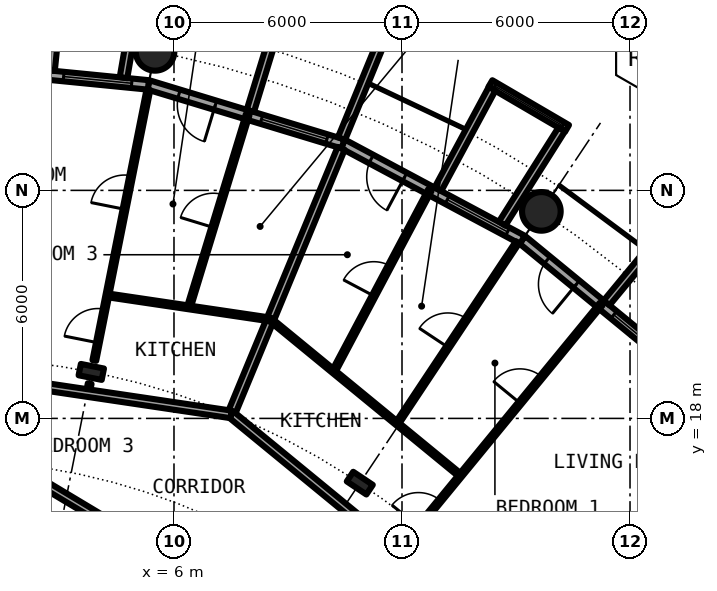
"""IFC4 building model, lengths in metres.
Left out: names, types, materials, properties, quantities, classifications, styles, units other than length and angle.
Written with IfcOpenShell. Run it as: python <this file> out.ifc"""

import sys

from ifc_helpers import new_model, si_unit, direction, frame, frame_2d, origin, origin_2d, place, context, subcontext, project, spatial, rectangle, circle, hollow_circle, i_section, extrude, element, fill, save


model = new_model("IFC4")
c1 = context("Model", 3, precision=1e-05, world=origin(), true_north=direction((0.0, 1.0)))
c2 = subcontext(c1, "Body", "Model", "MODEL_VIEW")
j1 = project(units=[si_unit("LENGTHUNIT", "METRE"), si_unit("PLANEANGLEUNIT", "RADIAN")], contexts=[c1])
p1 = place(None, origin())
s1 = spatial("IfcSite", under=j1, at=p1, CompositionType="ELEMENT")
p2 = place(p1, origin())
s2 = spatial("IfcBuilding", under=s1, at=p2, CompositionType="ELEMENT")
p3 = place(p2, frame((0.0, 0.0, 47.2)))
s3 = spatial("IfcBuildingStorey", under=s2, at=p3, CompositionType="ELEMENT", Elevation=47.2)
for number, where, z_axis, x_axis in (
    (1, (15.667, 23.448, 0.0), (0.0, 0.0, 1.0), (1.0, 0.0, 0.0)),
    (2, (5.501, 27.658, 0.0), (0.0, 0.0, 1.0), (1.0, 0.0, 0.0)),
):
    element("IfcColumn", number, at=place(p3, frame(where, z_axis=z_axis, x_axis=x_axis)), inside=s3, PredefinedType="COLUMN", context=c2, shape_type="SweptSolid", body=[
        extrude(hollow_circle(Radius=0.508, WallThickness=0.05, at=origin_2d()), origin(), (0.0, 0.0, 1.0), 3.05),
    ])
for number, where, z_axis, x_axis in (
    (3, (10.889, 16.297, 0.0), (0.0, 0.0, 1.0), (0.556, 0.831, 0.0)),
    (4, (3.824, 19.223, 0.0), (0.0, 0.0, 1.0), (0.195, 0.981, 0.0)),
):
    element("IfcColumn", number, at=place(p3, frame(where, z_axis=z_axis, x_axis=x_axis)), inside=s3, PredefinedType="COLUMN", context=c2, shape_type="SweptSolid", body=[
        extrude(i_section(OverallWidth=0.305, OverallDepth=0.62, WebThickness=0.021, FlangeThickness=0.04, FilletRadius=0.027, at=origin_2d()), origin(), (0.0, 0.0, 1.0), 3.05),
    ])
p4 = place(p3, frame((19.304, 19.304, 0.0), z_axis=(0.0, 0.0, 1.0), x_axis=(-0.773019449054, 0.634382322723, 0.0)))
e5 = element("IfcWall", 5, at=p4, inside=s3, PredefinedType="SOLIDWALL", context=c2, shape_type="SweptSolid", body=[
    extrude(rectangle(XDim=5.352, YDim=0.25, at=frame_2d((2.676, 0.0))), origin(), (0.0, 0.0, 1.0), 2.7),
])
p5 = place(p4, frame((0.441, 0.0, 0.3)))
e6 = element("IfcOpeningElement", 6, at=p5, cuts=e5, PredefinedType="OPENING", context=c2, shape_type="SweptSolid", body=[
    extrude(rectangle(XDim=1.8, YDim=2.1, at=frame_2d((0.9, 1.05))), frame((0.0, 0.135, 0.0), z_axis=(0.0, -1.0, 0.0), x_axis=(1.0, 0.0, 0.0)), (0.0, 0.0, 1.0), 0.27),
])
p6 = place(p4, frame((3.51, 0.0, 0.0)))
e7 = element("IfcOpeningElement", 7, at=p6, cuts=e5, PredefinedType="OPENING", context=c2, shape_type="SweptSolid", body=[
    extrude(rectangle(XDim=1.0, YDim=2.2, at=frame_2d((0.5, 1.1))), frame((0.0, 0.135, 0.0), z_axis=(0.0, -1.0, 0.0), x_axis=(1.0, 0.0, 0.0)), (0.0, 0.0, 1.0), 0.27),
])
p7 = place(p3, frame((17.384, 21.041, -0.03), z_axis=(0.0, 0.0, 1.0), x_axis=(0.63709551667, 0.770784861449, 0.0)))
e8 = element("IfcWall", 8, at=p7, inside=s3, PredefinedType="SOLIDWALL", context=c2, shape_type="SweptSolid", body=[
    extrude(rectangle(XDim=3.006, YDim=0.2, at=frame_2d((1.503, 0.0))), origin(), (0.0, 0.0, 1.0), 2.73),
])
p8 = place(p3, frame((15.167, 22.699, 0.0), z_axis=(0.0, 0.0, 1.0), x_axis=(-0.881915646801, 0.471407246368, 0.0)))
e9 = element("IfcWall", 9, at=p8, inside=s3, PredefinedType="SOLIDWALL", context=c2, shape_type="SweptSolid", body=[
    extrude(rectangle(XDim=5.352, YDim=0.25, at=frame_2d((2.676, 0.0))), origin(), (0.0, 0.0, 1.0), 2.7),
])
p9 = place(p8, frame((0.441, 0.0, 0.3)))
e10 = element("IfcOpeningElement", 10, at=p9, cuts=e9, PredefinedType="OPENING", context=c2, shape_type="SweptSolid", body=[
    extrude(rectangle(XDim=1.8, YDim=2.1, at=frame_2d((0.9, 1.05))), frame((0.0, 0.135, 0.0), z_axis=(0.0, -1.0, 0.0), x_axis=(1.0, 0.0, 0.0)), (0.0, 0.0, 1.0), 0.27),
])
p10 = place(p8, frame((3.51, 0.0, 0.0)))
e11 = element("IfcOpeningElement", 11, at=p10, cuts=e9, PredefinedType="OPENING", context=c2, shape_type="SweptSolid", body=[
    extrude(rectangle(XDim=1.0, YDim=2.2, at=frame_2d((0.5, 1.1))), frame((0.0, 0.135, 0.0), z_axis=(0.0, -1.0, 0.0), x_axis=(1.0, 0.0, 0.0)), (0.0, 0.0, 1.0), 0.27),
])
p11 = place(p3, frame((16.344, 25.633, -0.03), z_axis=(0.0, 0.0, 1.0), x_axis=(-0.863346521872, 0.504611517081, 0.0)))
e12 = element("IfcWall", 12, at=p11, inside=s3, PredefinedType="SOLIDWALL", context=c2, shape_type="SweptSolid", body=[
    extrude(rectangle(XDim=2.336, YDim=0.2, at=frame_2d((1.168, 0.0))), origin(), (0.0, 0.0, 1.0), 2.73),
])
p12 = place(p11, frame((0.128, 0.0, 0.33)))
e13 = element("IfcOpeningElement", 13, at=p12, cuts=e12, PredefinedType="OPENING", context=c2, shape_type="SweptSolid", body=[
    extrude(circle(Radius=1.04, at=frame_2d((1.04, 1.04))), frame((0.0, 0.11, 0.0), z_axis=(0.0, -1.0, 0.0), x_axis=(1.0, 0.0, 0.0)), (0.0, 0.0, 1.0), 0.22),
])
p13 = place(p3, frame((14.635, 23.126, -0.03), z_axis=(0.0, 0.0, 1.0), x_axis=(0.534437802731, 0.845207805816, 0.0)))
e14 = element("IfcWall", 14, at=p13, inside=s3, PredefinedType="SOLIDWALL", context=c2, shape_type="SweptSolid", body=[
    extrude(rectangle(XDim=2.932, YDim=0.2, at=frame_2d((1.466, 0.0))), origin(), (0.0, 0.0, 1.0), 2.73),
])
p14 = place(p3, frame((12.945, 24.029, -0.03), z_axis=(0.0, 0.0, 1.0), x_axis=(0.474424310775, 0.88029629861, 0.0)))
e15 = element("IfcWall", 15, at=p14, inside=s3, PredefinedType="SOLIDWALL", context=c2, shape_type="SweptSolid", body=[
    extrude(rectangle(XDim=3.006, YDim=0.2, at=frame_2d((1.503, 0.0))), origin(), (0.0, 0.0, 1.0), 2.73),
])
p15 = place(p3, frame((10.447, 25.222, 0.0), z_axis=(0.0, 0.0, 1.0), x_axis=(-0.956965678721, 0.290201119486, 0.0)))
e16 = element("IfcWall", 16, at=p15, inside=s3, PredefinedType="SOLIDWALL", context=c2, shape_type="SweptSolid", body=[
    extrude(rectangle(XDim=5.351, YDim=0.25, at=frame_2d((2.676, 0.0))), origin(), (0.0, 0.0, 1.0), 2.7),
])
p16 = place(p15, frame((0.441, 0.0, 0.3)))
e17 = element("IfcOpeningElement", 17, at=p16, cuts=e16, PredefinedType="OPENING", context=c2, shape_type="SweptSolid", body=[
    extrude(rectangle(XDim=1.8, YDim=2.1, at=frame_2d((0.9, 1.05))), frame((0.0, 0.135, 0.0), z_axis=(0.0, -1.0, 0.0), x_axis=(1.0, 0.0, 0.0)), (0.0, 0.0, 1.0), 0.27),
])
p17 = place(p15, frame((3.51, 0.0, 0.0)))
e18 = element("IfcOpeningElement", 18, at=p17, cuts=e16, PredefinedType="OPENING", context=c2, shape_type="SweptSolid", body=[
    extrude(rectangle(XDim=1.0, YDim=2.2, at=frame_2d((0.5, 1.1))), frame((0.0, 0.135, 0.0), z_axis=(0.0, -1.0, 0.0), x_axis=(1.0, 0.0, 0.0)), (0.0, 0.0, 1.0), 0.27),
])
p18 = place(p3, frame((10.409, 25.364, -0.03), z_axis=(0.0, 0.0, 1.0), x_axis=(0.379509886562, 0.925187681501, 0.0)))
e19 = element("IfcWall", 19, at=p18, inside=s3, PredefinedType="SOLIDWALL", context=c2, shape_type="SweptSolid", body=[
    extrude(rectangle(XDim=2.883, YDim=0.2, at=frame_2d((1.441, 0.0))), origin(), (0.0, 0.0, 1.0), 2.73),
])
p19 = place(p3, frame((8.009, 26.092, -0.03), z_axis=(0.0, 0.0, 1.0), x_axis=(0.293406695073, 0.955987715029, 0.0)))
e20 = element("IfcWall", 20, at=p19, inside=s3, PredefinedType="SOLIDWALL", context=c2, shape_type="SweptSolid", body=[
    extrude(rectangle(XDim=3.006, YDim=0.2, at=frame_2d((1.503, 0.0))), origin(), (0.0, 0.0, 1.0), 2.73),
])
p20 = place(p3, frame((5.326, 26.775, 0.0), z_axis=(0.0, 0.0, 1.0), x_axis=(-0.995173996315, 0.098126026407, 0.0)))
e21 = element("IfcWall", 21, at=p20, inside=s3, PredefinedType="SOLIDWALL", context=c2, shape_type="SweptSolid", body=[
    extrude(rectangle(XDim=5.352, YDim=0.25, at=frame_2d((2.676, 0.0))), origin(), (0.0, 0.0, 1.0), 2.7),
])
p21 = place(p20, frame((0.441, 0.0, 0.3)))
e22 = element("IfcOpeningElement", 22, at=p21, cuts=e21, PredefinedType="OPENING", context=c2, shape_type="SweptSolid", body=[
    extrude(rectangle(XDim=1.8, YDim=2.1, at=frame_2d((0.9, 1.05))), frame((0.0, 0.135, 0.0), z_axis=(0.0, -1.0, 0.0), x_axis=(1.0, 0.0, 0.0)), (0.0, 0.0, 1.0), 0.27),
])
p22 = place(p20, frame((3.51, 0.0, 0.0)))
e23 = element("IfcOpeningElement", 23, at=p22, cuts=e21, PredefinedType="OPENING", context=c2, shape_type="SweptSolid", body=[
    extrude(rectangle(XDim=1.0, YDim=2.2, at=frame_2d((0.5, 1.1))), frame((0.0, 0.135, 0.0), z_axis=(0.0, -1.0, 0.0), x_axis=(1.0, 0.0, 0.0)), (0.0, 0.0, 1.0), 0.27),
])
p23 = place(p3, frame((4.671, 26.966, -0.03), z_axis=(0.0, 0.0, 1.0), x_axis=(0.170539878907, 0.985350774954, 0.0)))
e24 = element("IfcWall", 24, at=p23, inside=s3, PredefinedType="SOLIDWALL", context=c2, shape_type="SweptSolid", body=[
    extrude(rectangle(XDim=2.932, YDim=0.2, at=frame_2d((1.466, 0.0))), origin(), (0.0, 0.0, 1.0), 2.73),
])
p24 = place(p3, frame((2.764, 27.153, -0.03), z_axis=(0.0, 0.0, 1.0), x_axis=(0.101505487237, 0.994834979311, 0.0)))
e25 = element("IfcWall", 25, at=p24, inside=s3, PredefinedType="SOLIDWALL", context=c2, shape_type="SweptSolid", body=[
    extrude(rectangle(XDim=3.007, YDim=0.2, at=frame_2d((1.503, 0.0))), origin(), (0.0, 0.0, 1.0), 2.73),
])
p25 = place(p3, frame((3.733, 18.667, 0.0), z_axis=(0.0, 0.0, 1.0), x_axis=(0.193340656307, 0.981131688724, 0.0)))
e26 = element("IfcWall", 26, at=p25, inside=s3, PredefinedType="PARTITIONING", context=c2, shape_type="SweptSolid", body=[
    extrude(rectangle(XDim=0.254, YDim=0.1, at=frame_2d((0.127, 0.0))), origin(), (0.0, 0.0, 1.0), 2.7),
])
p26 = place(p3, frame((3.904, 19.524, 0.0), z_axis=(0.0, 0.0, 1.0), x_axis=(0.195857618189, 0.980632343642, 0.0)))
e27 = element("IfcWall", 27, at=p26, inside=s3, PredefinedType="PARTITIONING", context=c2, shape_type="SweptSolid", body=[
    extrude(rectangle(XDim=7.265, YDim=0.1, at=frame_2d((3.632, 0.0))), origin(), (0.0, 0.0, 1.0), 2.7),
])
p27 = place(p26, frame((0.476, 0.0, 0.0)))
e28 = element("IfcOpeningElement", 28, at=p27, cuts=e27, PredefinedType="OPENING", context=c2, shape_type="SweptSolid", body=[
    extrude(rectangle(XDim=0.9, YDim=2.3, at=frame_2d((0.45, 1.15))), frame((0.0, 0.06, 0.0), z_axis=(0.0, -1.0, 0.0), x_axis=(1.0, 0.0, 0.0)), (0.0, 0.0, 1.0), 0.12),
])
p28 = place(p26, frame((4.058, 0.0, 0.0)))
e29 = element("IfcOpeningElement", 29, at=p28, cuts=e27, PredefinedType="OPENING", context=c2, shape_type="SweptSolid", body=[
    extrude(rectangle(XDim=0.9, YDim=2.3, at=frame_2d((0.45, 1.15))), frame((0.0, 0.06, 0.0), z_axis=(0.0, -1.0, 0.0), x_axis=(1.0, 0.0, 0.0)), (0.0, 0.0, 1.0), 0.12),
])
p29 = place(p3, frame((6.39, 20.921, 0.0), z_axis=(0.0, 0.0, 1.0), x_axis=(0.292081613207, 0.956393397732, 0.0)))
e30 = element("IfcWall", 30, at=p29, inside=s3, PredefinedType="PARTITIONING", context=c2, shape_type="SweptSolid", body=[
    extrude(rectangle(XDim=5.3, YDim=0.1, at=frame_2d((2.65, 0.0))), origin(), (0.0, 0.0, 1.0), 2.7),
])
p30 = place(p29, frame((2.2, 0.0, 0.0)))
e31 = element("IfcOpeningElement", 31, at=p30, cuts=e30, PredefinedType="OPENING", context=c2, shape_type="SweptSolid", body=[
    extrude(rectangle(XDim=0.9, YDim=2.3, at=frame_2d((0.45, 1.15))), frame((0.0, 0.06, 0.0), z_axis=(0.0, -1.0, 0.0), x_axis=(1.0, 0.0, 0.0)), (0.0, 0.0, 1.0), 0.12),
])
p31 = place(p3, frame((7.501, 18.108, 0.0), z_axis=(0.0, 0.0, 1.0), x_axis=(0.382600411313, 0.923913916587, 0.0)))
e32 = element("IfcWall", 32, at=p31, inside=s3, PredefinedType="PARTITIONING", context=c2, shape_type="SweptSolid", body=[
    extrude(rectangle(XDim=7.574, YDim=0.2, at=frame_2d((3.787, 0.0))), origin(), (0.0, 0.0, 1.0), 2.7),
])
p32 = place(p3, frame((10.202, 19.234, 0.0), z_axis=(0.0, 0.0, 1.0), x_axis=(0.468610030042, 0.883405139075, 0.0)))
e33 = element("IfcWall", 33, at=p32, inside=s3, PredefinedType="PARTITIONING", context=c2, shape_type="SweptSolid", body=[
    extrude(rectangle(XDim=5.403, YDim=0.1, at=frame_2d((2.702, 0.0))), origin(), (0.0, 0.0, 1.0), 2.7),
])
p33 = place(p32, frame((2.252, 0.0, 0.0)))
e34 = element("IfcOpeningElement", 34, at=p33, cuts=e33, PredefinedType="OPENING", context=c2, shape_type="SweptSolid", body=[
    extrude(rectangle(XDim=0.9, YDim=2.3, at=frame_2d((0.45, 1.15))), frame((0.0, 0.06, 0.0), z_axis=(0.0, -1.0, 0.0), x_axis=(1.0, 0.0, 0.0)), (0.0, 0.0, 1.0), 0.12),
])
p34 = place(p3, frame((11.87, 17.865, 0.0), z_axis=(0.0, 0.0, 1.0), x_axis=(0.553440102418, 0.832888980018, 0.0)))
e35 = element("IfcWall", 35, at=p34, inside=s3, PredefinedType="PARTITIONING", context=c2, shape_type="SweptSolid", body=[
    extrude(rectangle(XDim=5.726, YDim=0.1, at=frame_2d((2.863, 0.0))), origin(), (0.0, 0.0, 1.0), 2.7),
])
p35 = place(p34, frame((2.413, 0.0, 0.0)))
e36 = element("IfcOpeningElement", 36, at=p35, cuts=e35, PredefinedType="OPENING", context=c2, shape_type="SweptSolid", body=[
    extrude(rectangle(XDim=0.9, YDim=2.3, at=frame_2d((0.45, 1.15))), frame((0.0, 0.06, 0.0), z_axis=(0.0, -1.0, 0.0), x_axis=(1.0, 0.0, 0.0)), (0.0, 0.0, 1.0), 0.12),
])
p36 = place(p3, frame((11.899, 14.499, 0.0), z_axis=(0.0, 0.0, 1.0), x_axis=(0.634396151441, 0.77300810024, 0.0)))
e37 = element("IfcWall", 37, at=p36, inside=s3, PredefinedType="PARTITIONING", context=c2, shape_type="SweptSolid", body=[
    extrude(rectangle(XDim=8.419, YDim=0.1, at=frame_2d((4.209, 0.0))), origin(), (0.0, 0.0, 1.0), 2.7),
])
p37 = place(p36, frame((0.84, 0.0, 0.0)))
e38 = element("IfcOpeningElement", 38, at=p37, cuts=e37, PredefinedType="OPENING", context=c2, shape_type="SweptSolid", body=[
    extrude(rectangle(XDim=0.9, YDim=2.3, at=frame_2d((0.45, 1.15))), frame((0.0, 0.06, 0.0), z_axis=(0.0, -1.0, 0.0), x_axis=(1.0, 0.0, 0.0)), (0.0, 0.0, 1.0), 0.12),
])
p38 = place(p36, frame((5.051, 0.0, 0.0)))
e39 = element("IfcOpeningElement", 39, at=p38, cuts=e37, PredefinedType="OPENING", context=c2, shape_type="SweptSolid", body=[
    extrude(rectangle(XDim=0.9, YDim=2.3, at=frame_2d((0.45, 1.15))), frame((0.0, 0.06, 0.0), z_axis=(0.0, -1.0, 0.0), x_axis=(1.0, 0.0, 0.0)), (0.0, 0.0, 1.0), 0.12),
])
p39 = place(p3, frame((1.658, 16.819, 0.0), z_axis=(0.0, 0.0, 1.0), x_axis=(0.857688434449, -0.514169767113, 0.0)))
e40 = element("IfcWall", 40, at=p39, inside=s3, PredefinedType="PARTITIONING", context=c2, shape_type="SweptSolid", body=[
    extrude(rectangle(XDim=14.429, YDim=0.2, at=frame_2d((7.215, 0.0))), origin(), (0.0, 0.0, 1.0), 2.7),
])
p40 = place(p39, frame((4.316, 0.0, 0.0)))
e41 = element("IfcOpeningElement", 41, at=p40, cuts=e40, PredefinedType="OPENING", context=c2, shape_type="SweptSolid", body=[
    extrude(rectangle(XDim=1.0, YDim=2.3, at=frame_2d((0.5, 1.15))), frame((0.0, 0.11, 0.0), z_axis=(0.0, -1.0, 0.0), x_axis=(1.0, 0.0, 0.0)), (0.0, 0.0, 1.0), 0.22),
])
p41 = place(p3, frame((7.5, 18.108, 0.0), z_axis=(0.0, 0.0, 1.0), x_axis=(0.773041360816, -0.634355621452, 0.0)))
e42 = element("IfcWall", 42, at=p41, inside=s3, PredefinedType="PARTITIONING", context=c2, shape_type="SweptSolid", body=[
    extrude(rectangle(XDim=11.221, YDim=0.2, at=frame_2d((5.61, 0.0))), origin(), (0.0, 0.0, 1.0), 2.38),
])
p42 = place(p41, frame((7.083, 0.0, 0.0)))
e43 = element("IfcOpeningElement", 43, at=p42, cuts=e42, PredefinedType="OPENING", context=c2, shape_type="SweptSolid", body=[
    extrude(rectangle(XDim=1.0, YDim=2.3, at=frame_2d((0.5, 1.15))), frame((0.0, 0.11, 0.0), z_axis=(0.0, -1.0, 0.0), x_axis=(1.0, 0.0, 0.0)), (0.0, 0.0, 1.0), 0.22),
])
p43 = place(p3, frame((-1.921, 19.506, 0.0), z_axis=(0.0, 0.0, 1.0), x_axis=(0.989134446023, -0.147013767014, 0.0)))
e44 = element("IfcWall", 44, at=p43, inside=s3, PredefinedType="PARTITIONING", context=c2, shape_type="SweptSolid", body=[
    extrude(rectangle(XDim=9.531, YDim=0.2, at=frame_2d((4.765, 0.0))), origin(), (0.0, 0.0, 1.0), 2.38),
])
p44 = place(p43, frame((3.31, 0.0, 0.0)))
e45 = element("IfcOpeningElement", 45, at=p44, cuts=e44, PredefinedType="OPENING", context=c2, shape_type="SweptSolid", body=[
    extrude(rectangle(XDim=1.0, YDim=2.3, at=frame_2d((0.5, 1.15))), frame((0.0, 0.11, 0.0), z_axis=(0.0, -1.0, 0.0), x_axis=(1.0, 0.0, 0.0)), (0.0, 0.0, 1.0), 0.22),
])
p45 = place(p3, frame((8.534, 20.603, 0.0), z_axis=(0.0, 0.0, 1.0), x_axis=(0.773000340237, -0.634405606843, 0.0)))
e46 = element("IfcWall", 46, at=p45, inside=s3, PredefinedType="PARTITIONING", context=c2, shape_type="SweptSolid", body=[
    extrude(rectangle(XDim=6.474, YDim=0.1, at=frame_2d((3.237, 0.0))), origin(), (0.0, 0.0, 1.0), 2.7),
])
p46 = place(p3, frame((4.246, 21.239, 0.0), z_axis=(0.0, 0.0, 1.0), x_axis=(0.989178348771, -0.146718077695, 0.0)))
e47 = element("IfcWall", 47, at=p46, inside=s3, PredefinedType="PARTITIONING", context=c2, shape_type="SweptSolid", body=[
    extrude(rectangle(XDim=4.335, YDim=0.1, at=frame_2d((2.167, 0.0))), origin(), (0.0, 0.0, 1.0), 2.7),
])
p47 = place(p5, origin())
e48 = element("IfcWindow", 48, at=p47, inside=s3, PartitioningType="SINGLE_PANEL", PredefinedType="WINDOW", context=c2, shape_type="SweptSolid", body=[
    extrude(rectangle(XDim=1.8, YDim=2.1, at=frame_2d((0.9, 1.05))), frame((0.0, 0.03, 0.0), z_axis=(0.0, -1.0, 0.0), x_axis=(1.0, 0.0, 0.0)), (0.0, 0.0, 1.0), 0.06),
])
fill(e6, e48)
p48 = place(p6, origin())
e49 = element("IfcDoor", 49, at=p48, inside=s3, OperationType="SINGLE_SWING_LEFT", PredefinedType="DOOR", context=c2, shape_type="SweptSolid", body=[
    extrude(rectangle(XDim=1.0, YDim=2.2, at=frame_2d((0.5, 1.1))), frame((0.0, 0.025, 0.0), z_axis=(0.0, -1.0, 0.0), x_axis=(1.0, 0.0, 0.0)), (0.0, 0.0, 1.0), 0.05),
])
fill(e7, e49)
p49 = place(p9, origin())
e50 = element("IfcWindow", 50, at=p49, inside=s3, PartitioningType="SINGLE_PANEL", PredefinedType="WINDOW", context=c2, shape_type="SweptSolid", body=[
    extrude(rectangle(XDim=1.8, YDim=2.1, at=frame_2d((0.9, 1.05))), frame((0.0, 0.03, 0.0), z_axis=(0.0, -1.0, 0.0), x_axis=(1.0, 0.0, 0.0)), (0.0, 0.0, 1.0), 0.06),
])
fill(e10, e50)
p50 = place(p12, origin())
e51 = element("IfcWindow", 51, at=p50, inside=s3, PartitioningType="SINGLE_PANEL", PredefinedType="WINDOW", context=c2, shape_type="SweptSolid", body=[
    extrude(circle(Radius=1.04, at=frame_2d((1.04, 1.04))), frame((0.0, 0.03, 0.0), z_axis=(0.0, -1.0, 0.0), x_axis=(1.0, 0.0, 0.0)), (0.0, 0.0, 1.0), 0.06),
])
fill(e13, e51)
p51 = place(p10, origin())
e52 = element("IfcDoor", 52, at=p51, inside=s3, OperationType="SINGLE_SWING_LEFT", PredefinedType="DOOR", context=c2, shape_type="SweptSolid", body=[
    extrude(rectangle(XDim=1.0, YDim=2.2, at=frame_2d((0.5, 1.1))), frame((0.0, 0.025, 0.0), z_axis=(0.0, -1.0, 0.0), x_axis=(1.0, 0.0, 0.0)), (0.0, 0.0, 1.0), 0.05),
])
fill(e11, e52)
p52 = place(p16, origin())
e53 = element("IfcWindow", 53, at=p52, inside=s3, PartitioningType="SINGLE_PANEL", PredefinedType="WINDOW", context=c2, shape_type="SweptSolid", body=[
    extrude(rectangle(XDim=1.8, YDim=2.1, at=frame_2d((0.9, 1.05))), frame((0.0, 0.03, 0.0), z_axis=(0.0, -1.0, 0.0), x_axis=(1.0, 0.0, 0.0)), (0.0, 0.0, 1.0), 0.06),
])
fill(e17, e53)
p53 = place(p17, origin())
e54 = element("IfcDoor", 54, at=p53, inside=s3, OperationType="SINGLE_SWING_LEFT", PredefinedType="DOOR", context=c2, shape_type="SweptSolid", body=[
    extrude(rectangle(XDim=1.0, YDim=2.2, at=frame_2d((0.5, 1.1))), frame((0.0, 0.025, 0.0), z_axis=(0.0, -1.0, 0.0), x_axis=(1.0, 0.0, 0.0)), (0.0, 0.0, 1.0), 0.05),
])
fill(e18, e54)
p54 = place(p21, origin())
e55 = element("IfcWindow", 55, at=p54, inside=s3, PartitioningType="SINGLE_PANEL", PredefinedType="WINDOW", context=c2, shape_type="SweptSolid", body=[
    extrude(rectangle(XDim=1.8, YDim=2.1, at=frame_2d((0.9, 1.05))), frame((0.0, 0.03, 0.0), z_axis=(0.0, -1.0, 0.0), x_axis=(1.0, 0.0, 0.0)), (0.0, 0.0, 1.0), 0.06),
])
fill(e22, e55)
p55 = place(p37, origin())
e56 = element("IfcDoor", 56, at=p55, inside=s3, OperationType="SINGLE_SWING_LEFT", PredefinedType="DOOR", context=c2, shape_type="SweptSolid", body=[
    extrude(rectangle(XDim=0.9, YDim=2.3, at=frame_2d((0.45, 1.15))), frame((0.0, 0.025, 0.0), z_axis=(0.0, -1.0, 0.0), x_axis=(1.0, 0.0, 0.0)), (0.0, 0.0, 1.0), 0.05),
])
fill(e38, e56)
p56 = place(p38, origin())
e57 = element("IfcDoor", 57, at=p56, inside=s3, OperationType="SINGLE_SWING_RIGHT", PredefinedType="DOOR", context=c2, shape_type="SweptSolid", body=[
    extrude(rectangle(XDim=0.9, YDim=2.3, at=frame_2d((0.45, 1.15))), frame((0.0, 0.025, 0.0), z_axis=(0.0, -1.0, 0.0), x_axis=(1.0, 0.0, 0.0)), (0.0, 0.0, 1.0), 0.05),
])
fill(e39, e57)
p57 = place(p35, origin())
e58 = element("IfcDoor", 58, at=p57, inside=s3, OperationType="SINGLE_SWING_LEFT", PredefinedType="DOOR", context=c2, shape_type="SweptSolid", body=[
    extrude(rectangle(XDim=0.9, YDim=2.3, at=frame_2d((0.45, 1.15))), frame((0.0, 0.025, 0.0), z_axis=(0.0, -1.0, 0.0), x_axis=(1.0, 0.0, 0.0)), (0.0, 0.0, 1.0), 0.05),
])
fill(e36, e58)
p58 = place(p33, origin())
e59 = element("IfcDoor", 59, at=p58, inside=s3, OperationType="SINGLE_SWING_LEFT", PredefinedType="DOOR", context=c2, shape_type="SweptSolid", body=[
    extrude(rectangle(XDim=0.9, YDim=2.3, at=frame_2d((0.45, 1.15))), frame((0.0, 0.025, 0.0), z_axis=(0.0, -1.0, 0.0), x_axis=(1.0, 0.0, 0.0)), (0.0, 0.0, 1.0), 0.05),
])
fill(e34, e59)
p59 = place(p27, origin())
e60 = element("IfcDoor", 60, at=p59, inside=s3, OperationType="SINGLE_SWING_LEFT", PredefinedType="DOOR", context=c2, shape_type="SweptSolid", body=[
    extrude(rectangle(XDim=0.9, YDim=2.3, at=frame_2d((0.45, 1.15))), frame((0.0, 0.025, 0.0), z_axis=(0.0, -1.0, 0.0), x_axis=(1.0, 0.0, 0.0)), (0.0, 0.0, 1.0), 0.05),
])
fill(e28, e60)
p60 = place(p28, origin())
e61 = element("IfcDoor", 61, at=p60, inside=s3, OperationType="SINGLE_SWING_RIGHT", PredefinedType="DOOR", context=c2, shape_type="SweptSolid", body=[
    extrude(rectangle(XDim=0.9, YDim=2.3, at=frame_2d((0.45, 1.15))), frame((0.0, 0.025, 0.0), z_axis=(0.0, -1.0, 0.0), x_axis=(1.0, 0.0, 0.0)), (0.0, 0.0, 1.0), 0.05),
])
fill(e29, e61)
p61 = place(p30, origin())
e62 = element("IfcDoor", 62, at=p61, inside=s3, OperationType="SINGLE_SWING_LEFT", PredefinedType="DOOR", context=c2, shape_type="SweptSolid", body=[
    extrude(rectangle(XDim=0.9, YDim=2.3, at=frame_2d((0.45, 1.15))), frame((0.0, 0.025, 0.0), z_axis=(0.0, -1.0, 0.0), x_axis=(1.0, 0.0, 0.0)), (0.0, 0.0, 1.0), 0.05),
])
fill(e31, e62)
save(model, sys.argv[1])
